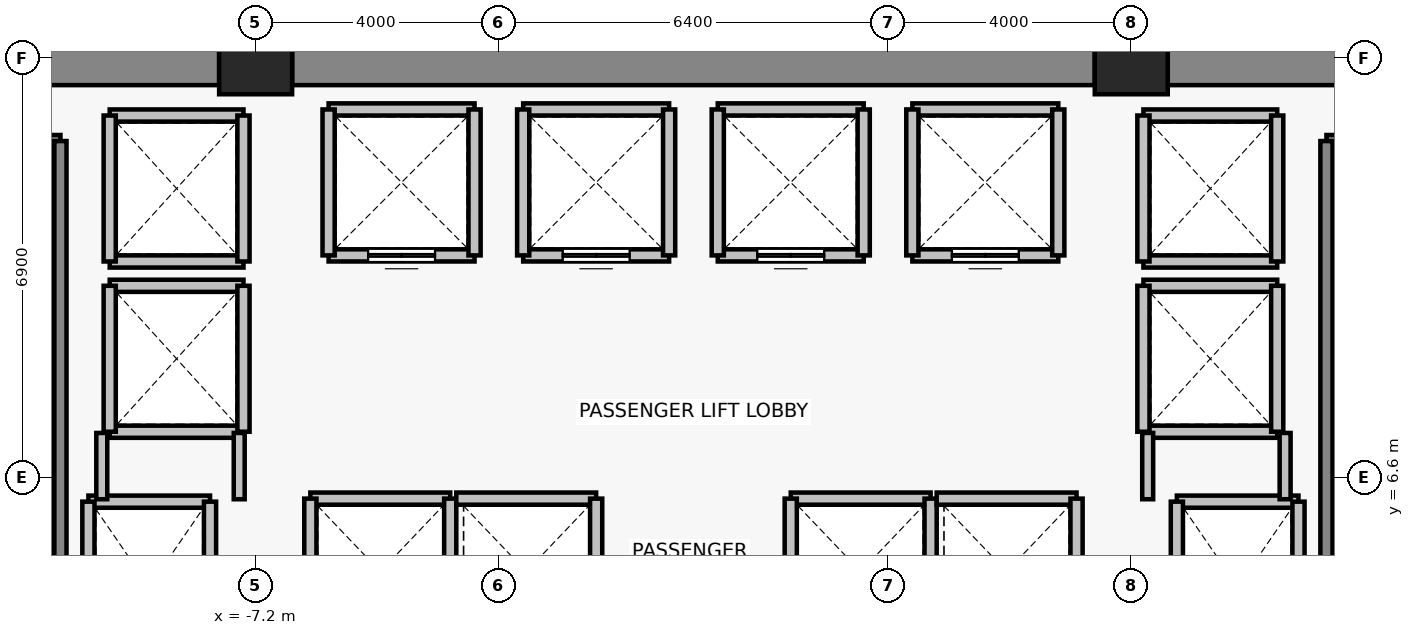
"""IFC4 building model, lengths in metres.
Left out: names, types, materials, properties, quantities, classifications, styles, units other than length and angle.
Written with IfcOpenShell. Run it as: python <this file> out.ifc"""

import sys

from ifc_helpers import new_model, si_unit, direction, frame, frame_2d, origin, origin_2d, place, context, subcontext, project, spatial, rectangle, extrude, source, transform, mapped, element, fill, save


model = new_model("IFC4")
c1 = context("Model", 3, precision=1e-05, world=origin(), true_north=direction((0.0, 1.0)))
c2 = subcontext(c1, "Body", "Model", "MODEL_VIEW")
j1 = project(units=[si_unit("LENGTHUNIT", "METRE"), si_unit("PLANEANGLEUNIT", "RADIAN")], contexts=[c1])
p1 = place(None, origin())
s1 = spatial("IfcSite", under=j1, at=p1, CompositionType="ELEMENT")
p2 = place(p1, origin())
s2 = spatial("IfcBuilding", under=s1, at=p2, CompositionType="ELEMENT")
p3 = place(p2, frame((0.0, 0.0, 22.6)))
s3 = spatial("IfcBuildingStorey", under=s2, at=p3, CompositionType="ELEMENT", Elevation=22.6)
for number, where, z_axis, x_axis in (
    (1, (-7.2, 13.5, 0.0), (0.0, 0.0, 1.0), (1.0, 0.0, 0.0)),
    (2, (7.2, 13.5, 0.0), (0.0, 0.0, 1.0), (1.0, 0.0, 0.0)),
):
    element("IfcColumn", number, at=place(p3, frame(where, z_axis=z_axis, x_axis=x_axis)), inside=s3, PredefinedType="COLUMN", context=c2, shape_type="SweptSolid", body=[
        extrude(rectangle(XDim=1.2, YDim=1.2, at=origin_2d()), origin(), (0.0, 0.0, 1.0), 4.8),
    ])
p4 = place(p3, frame((-13.8, 13.5, 0.0), z_axis=(0.0, 0.0, 1.0), x_axis=(1.0, 0.0, 0.0)))
e3 = element("IfcWall", 3, at=p4, inside=s3, PredefinedType="SHEAR", context=c2, shape_type="SweptSolid", body=[
    extrude(rectangle(XDim=6.0, YDim=0.9, at=frame_2d((3.0, 0.0))), origin(), (0.0, 0.0, 1.0), 4.55),
])
p5 = place(p3, frame((-6.6, 13.5, 0.0), z_axis=(0.0, 0.0, 1.0), x_axis=(1.0, 0.0, 0.0)))
e4 = element("IfcWall", 4, at=p5, inside=s3, PredefinedType="SHEAR", context=c2, shape_type="SweptSolid", body=[
    extrude(rectangle(XDim=13.2, YDim=0.9, at=frame_2d((6.6, 0.0))), origin(), (0.0, 0.0, 1.0), 4.55),
])
p6 = place(p3, frame((7.8, 13.5, 0.0), z_axis=(0.0, 0.0, 1.0), x_axis=(1.0, 0.0, 0.0)))
e5 = element("IfcWall", 5, at=p6, inside=s3, PredefinedType="SHEAR", context=c2, shape_type="SweptSolid", body=[
    extrude(rectangle(XDim=6.0, YDim=0.9, at=frame_2d((3.0, 0.0))), origin(), (0.0, 0.0, 1.0), 4.55),
])
p7 = place(p3, frame((-9.95, 6.2, 0.0), z_axis=(0.0, 0.0, 1.0), x_axis=(1.0, 0.0, 0.0)))
e6 = element("IfcWall", 6, at=p7, inside=s3, PredefinedType="SOLIDWALL", context=c2, shape_type="SweptSolid", body=[
    extrude(rectangle(XDim=2.0, YDim=0.2, at=frame_2d((1.0, 0.0))), origin(), (0.0, 0.0, 1.0), 4.55),
])
for number, where, z_axis, x_axis in (
    (7, (-9.95, 3.4, 0.0), (0.0, 0.0, 1.0), (0.0, 1.0, 0.0)),
    (8, (-7.95, 6.2, 0.0), (0.0, 0.0, 1.0), (0.0, -1.0, 0.0)),
):
    element("IfcWall", number, at=place(p3, frame(where, z_axis=z_axis, x_axis=x_axis)), inside=s3, PredefinedType="SOLIDWALL", context=c2, shape_type="SweptSolid", body=[
        extrude(rectangle(XDim=2.8, YDim=0.2, at=frame_2d((1.4, 0.0))), origin(), (0.0, 0.0, 1.0), 4.55),
    ])
p8 = place(p3, frame((7.95, 6.2, 0.0), z_axis=(0.0, 0.0, 1.0), x_axis=(1.0, 0.0, 0.0)))
e9 = element("IfcWall", 9, at=p8, inside=s3, PredefinedType="SOLIDWALL", context=c2, shape_type="SweptSolid", body=[
    extrude(rectangle(XDim=2.0, YDim=0.2, at=frame_2d((1.0, 0.0))), origin(), (0.0, 0.0, 1.0), 4.55),
])
for number, where, z_axis, x_axis in (
    (10, (7.95, 3.4, 0.0), (0.0, 0.0, 1.0), (0.0, 1.0, 0.0)),
    (11, (9.95, 6.2, 0.0), (0.0, 0.0, 1.0), (0.0, -1.0, 0.0)),
):
    element("IfcWall", number, at=place(p3, frame(where, z_axis=z_axis, x_axis=x_axis)), inside=s3, PredefinedType="SOLIDWALL", context=c2, shape_type="SweptSolid", body=[
        extrude(rectangle(XDim=2.8, YDim=0.2, at=frame_2d((1.4, 0.0))), origin(), (0.0, 0.0, 1.0), 4.55),
    ])
p9 = place(p3, frame((-3.6, 10.25, 0.0), z_axis=(0.0, 0.0, 1.0), x_axis=(-1.0, 0.0, 0.0)))
e12 = element("IfcWall", 12, at=p9, inside=s3, PredefinedType="SOLIDWALL", context=c2, shape_type="SweptSolid", body=[
    extrude(rectangle(XDim=2.4, YDim=0.2, at=frame_2d((1.2, 0.0))), origin(), (0.0, 0.0, 1.0), 4.55),
])
p10 = place(p9, frame((0.65, 0.0, 0.0)))
e13 = element("IfcOpeningElement", 13, at=p10, cuts=e12, PredefinedType="OPENING", context=c2, shape_type="SweptSolid", body=[
    extrude(rectangle(XDim=1.1, YDim=2.2, at=frame_2d((0.55, 1.1))), frame((0.0, 0.11, 0.0), z_axis=(0.0, -1.0, 0.0), x_axis=(1.0, 0.0, 0.0)), (0.0, 0.0, 1.0), 0.22),
])
for number, where, z_axis, x_axis in (
    (14, (-6.0, 12.65, 0.0), (0.0, 0.0, 1.0), (1.0, 0.0, 0.0)),
    (15, (-6.0, 10.25, 0.0), (0.0, 0.0, 1.0), (0.0, 1.0, 0.0)),
    (16, (-3.6, 12.65, 0.0), (0.0, 0.0, 1.0), (0.0, -1.0, 0.0)),
):
    element("IfcWall", number, at=place(p3, frame(where, z_axis=z_axis, x_axis=x_axis)), inside=s3, PredefinedType="SOLIDWALL", context=c2, shape_type="SweptSolid", body=[
        extrude(rectangle(XDim=2.4, YDim=0.2, at=frame_2d((1.2, 0.0))), origin(), (0.0, 0.0, 1.0), 4.55),
    ])
p11 = place(p3, frame((-0.4, 10.25, 0.0), z_axis=(0.0, 0.0, 1.0), x_axis=(-1.0, 0.0, 0.0)))
e17 = element("IfcWall", 17, at=p11, inside=s3, PredefinedType="SOLIDWALL", context=c2, shape_type="SweptSolid", body=[
    extrude(rectangle(XDim=2.4, YDim=0.2, at=frame_2d((1.2, 0.0))), origin(), (0.0, 0.0, 1.0), 4.55),
])
p12 = place(p11, frame((0.65, 0.0, 0.0)))
e18 = element("IfcOpeningElement", 18, at=p12, cuts=e17, PredefinedType="OPENING", context=c2, shape_type="SweptSolid", body=[
    extrude(rectangle(XDim=1.1, YDim=2.2, at=frame_2d((0.55, 1.1))), frame((0.0, 0.11, 0.0), z_axis=(0.0, -1.0, 0.0), x_axis=(1.0, 0.0, 0.0)), (0.0, 0.0, 1.0), 0.22),
])
p13 = place(p3, frame((-2.8, 12.65, 0.0), z_axis=(0.0, 0.0, 1.0), x_axis=(1.0, 0.0, 0.0)))
e19 = element("IfcWall", 19, at=p13, inside=s3, PredefinedType="SOLIDWALL", context=c2, shape_type="SweptSolid", body=[
    extrude(rectangle(XDim=2.4, YDim=0.2, at=frame_2d((1.2, 0.0))), origin(), (0.0, 0.0, 1.0), 4.55),
])
for number, where, z_axis, x_axis in (
    (20, (-2.8, 10.25, 0.0), (0.0, 0.0, 1.0), (0.0, 1.0, 0.0)),
    (21, (-0.4, 12.65, 0.0), (0.0, 0.0, 1.0), (0.0, -1.0, 0.0)),
):
    element("IfcWall", number, at=place(p3, frame(where, z_axis=z_axis, x_axis=x_axis)), inside=s3, PredefinedType="SOLIDWALL", context=c2, shape_type="SweptSolid", body=[
        extrude(rectangle(XDim=2.4, YDim=0.2, at=frame_2d((1.2, 0.0))), origin(), (0.0, 0.0, 1.0), 4.55),
    ])
p14 = place(p3, frame((2.8, 10.25, 0.0), z_axis=(0.0, 0.0, 1.0), x_axis=(-1.0, 0.0, 0.0)))
e22 = element("IfcWall", 22, at=p14, inside=s3, PredefinedType="SOLIDWALL", context=c2, shape_type="SweptSolid", body=[
    extrude(rectangle(XDim=2.4, YDim=0.2, at=frame_2d((1.2, 0.0))), origin(), (0.0, 0.0, 1.0), 4.55),
])
p15 = place(p14, frame((0.65, 0.0, 0.0)))
e23 = element("IfcOpeningElement", 23, at=p15, cuts=e22, PredefinedType="OPENING", context=c2, shape_type="SweptSolid", body=[
    extrude(rectangle(XDim=1.1, YDim=2.2, at=frame_2d((0.55, 1.1))), frame((0.0, 0.11, 0.0), z_axis=(0.0, -1.0, 0.0), x_axis=(1.0, 0.0, 0.0)), (0.0, 0.0, 1.0), 0.22),
])
p16 = place(p3, frame((0.4, 12.65, 0.0), z_axis=(0.0, 0.0, 1.0), x_axis=(1.0, 0.0, 0.0)))
e24 = element("IfcWall", 24, at=p16, inside=s3, PredefinedType="SOLIDWALL", context=c2, shape_type="SweptSolid", body=[
    extrude(rectangle(XDim=2.4, YDim=0.2, at=frame_2d((1.2, 0.0))), origin(), (0.0, 0.0, 1.0), 4.55),
])
for number, where, z_axis, x_axis in (
    (25, (0.4, 10.25, 0.0), (0.0, 0.0, 1.0), (0.0, 1.0, 0.0)),
    (26, (2.8, 12.65, 0.0), (0.0, 0.0, 1.0), (0.0, -1.0, 0.0)),
):
    element("IfcWall", number, at=place(p3, frame(where, z_axis=z_axis, x_axis=x_axis)), inside=s3, PredefinedType="SOLIDWALL", context=c2, shape_type="SweptSolid", body=[
        extrude(rectangle(XDim=2.4, YDim=0.2, at=frame_2d((1.2, 0.0))), origin(), (0.0, 0.0, 1.0), 4.55),
    ])
p17 = place(p3, frame((6.0, 10.25, 0.0), z_axis=(0.0, 0.0, 1.0), x_axis=(-1.0, 0.0, 0.0)))
e27 = element("IfcWall", 27, at=p17, inside=s3, PredefinedType="SOLIDWALL", context=c2, shape_type="SweptSolid", body=[
    extrude(rectangle(XDim=2.4, YDim=0.2, at=frame_2d((1.2, 0.0))), origin(), (0.0, 0.0, 1.0), 4.55),
])
p18 = place(p17, frame((0.65, 0.0, 0.0)))
e28 = element("IfcOpeningElement", 28, at=p18, cuts=e27, PredefinedType="OPENING", context=c2, shape_type="SweptSolid", body=[
    extrude(rectangle(XDim=1.1, YDim=2.2, at=frame_2d((0.55, 1.1))), frame((0.0, 0.11, 0.0), z_axis=(0.0, -1.0, 0.0), x_axis=(1.0, 0.0, 0.0)), (0.0, 0.0, 1.0), 0.22),
])
for number, where, z_axis, x_axis in (
    (29, (3.6, 12.65, 0.0), (0.0, 0.0, 1.0), (1.0, 0.0, 0.0)),
    (30, (3.6, 10.25, 0.0), (0.0, 0.0, 1.0), (0.0, 1.0, 0.0)),
    (31, (6.0, 12.65, 0.0), (0.0, 0.0, 1.0), (0.0, -1.0, 0.0)),
):
    element("IfcWall", number, at=place(p3, frame(where, z_axis=z_axis, x_axis=x_axis)), inside=s3, PredefinedType="SOLIDWALL", context=c2, shape_type="SweptSolid", body=[
        extrude(rectangle(XDim=2.4, YDim=0.2, at=frame_2d((1.2, 0.0))), origin(), (0.0, 0.0, 1.0), 4.55),
    ])
p19 = place(p3, frame((-6.3, 6.25, 0.0), z_axis=(0.0, 0.0, 1.0), x_axis=(1.0, 0.0, 0.0)))
e32 = element("IfcWall", 32, at=p19, inside=s3, PredefinedType="SOLIDWALL", context=c2, shape_type="SweptSolid", body=[
    extrude(rectangle(XDim=2.3, YDim=0.2, at=frame_2d((1.15, 0.0))), origin(), (0.0, 0.0, 1.0), 4.55),
])
for number, where, z_axis, x_axis in (
    (33, (-6.3, 3.85, 0.0), (0.0, 0.0, 1.0), (0.0, 1.0, 0.0)),
    (34, (-4.0, 6.25, 0.0), (0.0, 0.0, 1.0), (0.0, -1.0, 0.0)),
):
    element("IfcWall", number, at=place(p3, frame(where, z_axis=z_axis, x_axis=x_axis)), inside=s3, PredefinedType="SOLIDWALL", context=c2, shape_type="SweptSolid", body=[
        extrude(rectangle(XDim=2.4, YDim=0.2, at=frame_2d((1.2, 0.0))), origin(), (0.0, 0.0, 1.0), 4.55),
    ])
p20 = place(p3, frame((-3.9, 6.25, 0.0), z_axis=(0.0, 0.0, 1.0), x_axis=(1.0, 0.0, 0.0)))
e35 = element("IfcWall", 35, at=p20, inside=s3, PredefinedType="SOLIDWALL", context=c2, shape_type="SweptSolid", body=[
    extrude(rectangle(XDim=2.3, YDim=0.2, at=frame_2d((1.15, 0.0))), origin(), (0.0, 0.0, 1.0), 4.55),
])
p21 = place(p3, frame((-1.6, 6.25, 0.0), z_axis=(0.0, 0.0, 1.0), x_axis=(0.0, -1.0, 0.0)))
e36 = element("IfcWall", 36, at=p21, inside=s3, PredefinedType="SOLIDWALL", context=c2, shape_type="SweptSolid", body=[
    extrude(rectangle(XDim=2.4, YDim=0.2, at=frame_2d((1.2, 0.0))), origin(), (0.0, 0.0, 1.0), 4.55),
])
p22 = place(p3, frame((1.6, 6.25, 0.0), z_axis=(0.0, 0.0, 1.0), x_axis=(1.0, 0.0, 0.0)))
e37 = element("IfcWall", 37, at=p22, inside=s3, PredefinedType="SOLIDWALL", context=c2, shape_type="SweptSolid", body=[
    extrude(rectangle(XDim=2.3, YDim=0.2, at=frame_2d((1.15, 0.0))), origin(), (0.0, 0.0, 1.0), 4.55),
])
for number, where, z_axis, x_axis in (
    (38, (1.6, 3.85, 0.0), (0.0, 0.0, 1.0), (0.0, 1.0, 0.0)),
    (39, (3.9, 6.25, 0.0), (0.0, 0.0, 1.0), (0.0, -1.0, 0.0)),
):
    element("IfcWall", number, at=place(p3, frame(where, z_axis=z_axis, x_axis=x_axis)), inside=s3, PredefinedType="SOLIDWALL", context=c2, shape_type="SweptSolid", body=[
        extrude(rectangle(XDim=2.4, YDim=0.2, at=frame_2d((1.2, 0.0))), origin(), (0.0, 0.0, 1.0), 4.55),
    ])
p23 = place(p3, frame((4.0, 6.25, 0.0), z_axis=(0.0, 0.0, 1.0), x_axis=(1.0, 0.0, 0.0)))
e40 = element("IfcWall", 40, at=p23, inside=s3, PredefinedType="SOLIDWALL", context=c2, shape_type="SweptSolid", body=[
    extrude(rectangle(XDim=2.3, YDim=0.2, at=frame_2d((1.15, 0.0))), origin(), (0.0, 0.0, 1.0), 4.55),
])
p24 = place(p3, frame((6.3, 6.25, 0.0), z_axis=(0.0, 0.0, 1.0), x_axis=(0.0, -1.0, 0.0)))
e41 = element("IfcWall", 41, at=p24, inside=s3, PredefinedType="SOLIDWALL", context=c2, shape_type="SweptSolid", body=[
    extrude(rectangle(XDim=2.4, YDim=0.2, at=frame_2d((1.2, 0.0))), origin(), (0.0, 0.0, 1.0), 4.55),
])
for number, where, z_axis, x_axis in (
    (42, (-7.4, 7.35, 0.0), (0.0, 0.0, 1.0), (-1.0, 0.0, 0.0)),
    (43, (-9.6, 9.75, 0.0), (0.0, 0.0, 1.0), (1.0, 0.0, 0.0)),
):
    element("IfcWall", number, at=place(p3, frame(where, z_axis=z_axis, x_axis=x_axis)), inside=s3, PredefinedType="SOLIDWALL", context=c2, shape_type="SweptSolid", body=[
        extrude(rectangle(XDim=2.2, YDim=0.2, at=frame_2d((1.1, 0.0))), origin(), (0.0, 0.0, 1.0), 3.09),
    ])
p25 = place(p3, frame((-9.6, 7.35, 0.0), z_axis=(0.0, 0.0, 1.0), x_axis=(0.0, 1.0, 0.0)))
e44 = element("IfcWall", 44, at=p25, inside=s3, PredefinedType="SOLIDWALL", context=c2, shape_type="SweptSolid", body=[
    extrude(rectangle(XDim=2.4, YDim=0.2, at=frame_2d((1.2, 0.0))), origin(), (0.0, 0.0, 1.0), 4.55),
])
p26 = place(p3, frame((-7.4, 9.75, 0.0), z_axis=(0.0, 0.0, 1.0), x_axis=(0.0, -1.0, 0.0)))
e45 = element("IfcWall", 45, at=p26, inside=s3, PredefinedType="SOLIDWALL", context=c2, shape_type="SweptSolid", body=[
    extrude(rectangle(XDim=2.4, YDim=0.2, at=frame_2d((1.2, 0.0))), origin(), (0.0, 0.0, 1.0), 3.09),
])
for number, where, z_axis, x_axis in (
    (46, (-7.4, 10.15, 0.0), (0.0, 0.0, 1.0), (-1.0, 0.0, 0.0)),
    (47, (-9.6, 12.55, 0.0), (0.0, 0.0, 1.0), (1.0, 0.0, 0.0)),
):
    element("IfcWall", number, at=place(p3, frame(where, z_axis=z_axis, x_axis=x_axis)), inside=s3, PredefinedType="SOLIDWALL", context=c2, shape_type="SweptSolid", body=[
        extrude(rectangle(XDim=2.2, YDim=0.2, at=frame_2d((1.1, 0.0))), origin(), (0.0, 0.0, 1.0), 3.09),
    ])
p27 = place(p3, frame((-9.6, 10.15, 0.0), z_axis=(0.0, 0.0, 1.0), x_axis=(0.0, 1.0, 0.0)))
e48 = element("IfcWall", 48, at=p27, inside=s3, PredefinedType="SOLIDWALL", context=c2, shape_type="SweptSolid", body=[
    extrude(rectangle(XDim=2.4, YDim=0.2, at=frame_2d((1.2, 0.0))), origin(), (0.0, 0.0, 1.0), 4.55),
])
p28 = place(p3, frame((-7.4, 12.55, 0.0), z_axis=(0.0, 0.0, 1.0), x_axis=(0.0, -1.0, 0.0)))
e49 = element("IfcWall", 49, at=p28, inside=s3, PredefinedType="SOLIDWALL", context=c2, shape_type="SweptSolid", body=[
    extrude(rectangle(XDim=2.4, YDim=0.2, at=frame_2d((1.2, 0.0))), origin(), (0.0, 0.0, 1.0), 3.09),
])
for number, where, z_axis, x_axis in (
    (50, (9.6, 7.35, 0.0), (0.0, 0.0, 1.0), (-1.0, 0.0, 0.0)),
    (51, (7.4, 9.75, 0.0), (0.0, 0.0, 1.0), (1.0, 0.0, 0.0)),
):
    element("IfcWall", number, at=place(p3, frame(where, z_axis=z_axis, x_axis=x_axis)), inside=s3, PredefinedType="SOLIDWALL", context=c2, shape_type="SweptSolid", body=[
        extrude(rectangle(XDim=2.2, YDim=0.2, at=frame_2d((1.1, 0.0))), origin(), (0.0, 0.0, 1.0), 3.09),
    ])
p29 = place(p3, frame((7.4, 7.35, 0.0), z_axis=(0.0, 0.0, 1.0), x_axis=(0.0, 1.0, 0.0)))
e52 = element("IfcWall", 52, at=p29, inside=s3, PredefinedType="SOLIDWALL", context=c2, shape_type="SweptSolid", body=[
    extrude(rectangle(XDim=2.4, YDim=0.2, at=frame_2d((1.2, 0.0))), origin(), (0.0, 0.0, 1.0), 3.09),
])
p30 = place(p3, frame((9.6, 9.75, 0.0), z_axis=(0.0, 0.0, 1.0), x_axis=(0.0, -1.0, 0.0)))
e53 = element("IfcWall", 53, at=p30, inside=s3, PredefinedType="SOLIDWALL", context=c2, shape_type="SweptSolid", body=[
    extrude(rectangle(XDim=2.4, YDim=0.2, at=frame_2d((1.2, 0.0))), origin(), (0.0, 0.0, 1.0), 4.55),
])
for number, where, z_axis, x_axis in (
    (54, (9.6, 10.15, 0.0), (0.0, 0.0, 1.0), (-1.0, 0.0, 0.0)),
    (55, (7.4, 12.55, 0.0), (0.0, 0.0, 1.0), (1.0, 0.0, 0.0)),
):
    element("IfcWall", number, at=place(p3, frame(where, z_axis=z_axis, x_axis=x_axis)), inside=s3, PredefinedType="SOLIDWALL", context=c2, shape_type="SweptSolid", body=[
        extrude(rectangle(XDim=2.2, YDim=0.2, at=frame_2d((1.1, 0.0))), origin(), (0.0, 0.0, 1.0), 3.09),
    ])
p31 = place(p3, frame((7.4, 10.15, 0.0), z_axis=(0.0, 0.0, 1.0), x_axis=(0.0, 1.0, 0.0)))
e56 = element("IfcWall", 56, at=p31, inside=s3, PredefinedType="SOLIDWALL", context=c2, shape_type="SweptSolid", body=[
    extrude(rectangle(XDim=2.4, YDim=0.2, at=frame_2d((1.2, 0.0))), origin(), (0.0, 0.0, 1.0), 3.09),
])
p32 = place(p3, frame((9.6, 12.55, 0.0), z_axis=(0.0, 0.0, 1.0), x_axis=(0.0, -1.0, 0.0)))
e57 = element("IfcWall", 57, at=p32, inside=s3, PredefinedType="SOLIDWALL", context=c2, shape_type="SweptSolid", body=[
    extrude(rectangle(XDim=2.4, YDim=0.2, at=frame_2d((1.2, 0.0))), origin(), (0.0, 0.0, 1.0), 4.55),
])
p33 = place(p3, frame((-13.93, 12.13, 0.0), z_axis=(0.0, 0.0, 1.0), x_axis=(1.0, 0.0, 0.0)))
e58 = element("IfcWall", 58, at=p33, inside=s3, PredefinedType="SOLIDWALL", context=c2, shape_type="SweptSolid", body=[
    extrude(rectangle(XDim=3.52, YDim=0.2, at=frame_2d((1.76, 0.0))), origin(), (0.0, 0.0, 1.0), 4.55),
])
p34 = place(p3, frame((-10.41, 12.13, 0.0), z_axis=(0.0, 0.0, 1.0), x_axis=(0.0, -1.0, 0.0)))
e59 = element("IfcWall", 59, at=p34, inside=s3, PredefinedType="SOLIDWALL", context=c2, shape_type="SweptSolid", body=[
    extrude(rectangle(XDim=8.84, YDim=0.2, at=frame_2d((4.42, 0.0))), origin(), (0.0, 0.0, 1.0), 4.55),
])
p35 = place(p3, frame((10.41, 12.13, 0.0), z_axis=(0.0, 0.0, 1.0), x_axis=(1.0, 0.0, 0.0)))
e60 = element("IfcWall", 60, at=p35, inside=s3, PredefinedType="SOLIDWALL", context=c2, shape_type="SweptSolid", body=[
    extrude(rectangle(XDim=3.52, YDim=0.2, at=frame_2d((1.76, 0.0))), origin(), (0.0, 0.0, 1.0), 4.55),
])
p36 = place(p3, frame((10.41, 3.29, 0.0), z_axis=(0.0, 0.0, 1.0), x_axis=(0.0, 1.0, 0.0)))
e61 = element("IfcWall", 61, at=p36, inside=s3, PredefinedType="SOLIDWALL", context=c2, shape_type="SweptSolid", body=[
    extrude(rectangle(XDim=8.84, YDim=0.2, at=frame_2d((4.42, 0.0))), origin(), (0.0, 0.0, 1.0), 4.55),
])
p37 = place(p3, frame((-9.73, 6.24, 0.0), z_axis=(0.0, 0.0, 1.0), x_axis=(0.0, 1.0, 0.0)))
e62 = element("IfcWall", 62, at=p37, inside=s3, PredefinedType="PARTITIONING", context=c2, shape_type="SweptSolid", body=[
    extrude(rectangle(XDim=1.09, YDim=0.18, at=frame_2d((0.545, 0.0))), origin(), (0.0, 0.0, 1.0), 4.55),
])
for number, where, z_axis, x_axis in (
    (63, (-7.47, 7.33, 0.0), (0.0, 0.0, 1.0), (0.0, -1.0, 0.0)),
    (64, (7.47, 6.24, 0.0), (0.0, 0.0, 1.0), (0.0, 1.0, 0.0)),
):
    element("IfcWall", number, at=place(p3, frame(where, z_axis=z_axis, x_axis=x_axis)), inside=s3, PredefinedType="PARTITIONING", context=c2, shape_type="SweptSolid", body=[
        extrude(rectangle(XDim=1.09, YDim=0.18, at=frame_2d((0.545, 0.0))), origin(), (0.0, 0.0, 1.0), 3.09),
    ])
p38 = place(p3, frame((9.73, 7.33, 0.0), z_axis=(0.0, 0.0, 1.0), x_axis=(0.0, -1.0, 0.0)))
e65 = element("IfcWall", 65, at=p38, inside=s3, PredefinedType="PARTITIONING", context=c2, shape_type="SweptSolid", body=[
    extrude(rectangle(XDim=1.09, YDim=0.18, at=frame_2d((0.545, 0.0))), origin(), (0.0, 0.0, 1.0), 4.55),
])
m1 = source(origin(), c2, "Body", "SweptSolid", [
    extrude(rectangle(XDim=1.1, YDim=2.2, at=frame_2d((0.55, 1.1))), frame((0.0, 0.025, 0.0), z_axis=(0.0, -1.0, 0.0), x_axis=(1.0, 0.0, 0.0)), (0.0, 0.0, 1.0), 0.05),
])
p39 = place(p10, origin())
e66 = element("IfcDoor", 66, at=p39, inside=s3, OperationType="DOUBLE_DOOR_SLIDING", PredefinedType="DOOR", context=c2, shape_type="MappedRepresentation", body=[
    mapped(m1, transform((0.0, 0.0, 0.0), x_axis=(1.0, 0.0, 0.0), y_axis=(0.0, 1.0, 0.0), z_axis=(0.0, 0.0, 1.0), scale=1.0)),
])
fill(e13, e66)
p40 = place(p12, origin())
e67 = element("IfcDoor", 67, at=p40, inside=s3, OperationType="DOUBLE_DOOR_SLIDING", PredefinedType="DOOR", context=c2, shape_type="MappedRepresentation", body=[
    mapped(m1, transform((0.0, 0.0, 0.0), x_axis=(1.0, 0.0, 0.0), y_axis=(0.0, 1.0, 0.0), z_axis=(0.0, 0.0, 1.0), scale=1.0)),
])
fill(e18, e67)
p41 = place(p15, origin())
e68 = element("IfcDoor", 68, at=p41, inside=s3, OperationType="DOUBLE_DOOR_SLIDING", PredefinedType="DOOR", context=c2, shape_type="MappedRepresentation", body=[
    mapped(m1, transform((0.0, 0.0, 0.0), x_axis=(1.0, 0.0, 0.0), y_axis=(0.0, 1.0, 0.0), z_axis=(0.0, 0.0, 1.0), scale=1.0)),
])
fill(e23, e68)
p42 = place(p18, origin())
e69 = element("IfcDoor", 69, at=p42, inside=s3, OperationType="DOUBLE_DOOR_SLIDING", PredefinedType="DOOR", context=c2, shape_type="MappedRepresentation", body=[
    mapped(m1, transform((0.0, 0.0, 0.0), x_axis=(1.0, 0.0, 0.0), y_axis=(0.0, 1.0, 0.0), z_axis=(0.0, 0.0, 1.0), scale=1.0)),
])
fill(e28, e69)
save(model, sys.argv[1])
